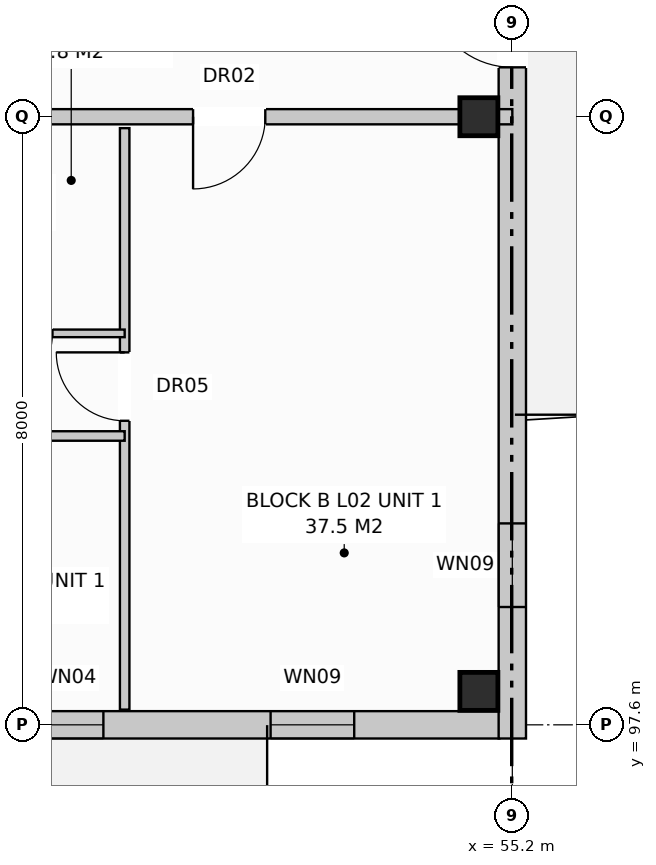
"""IFC4 building model, lengths in metres.
Left out: names, types, materials, properties, quantities, classifications, styles, units other than length and angle.
Written with IfcOpenShell. Run it as: python <this file> out.ifc"""

import sys

from ifc_helpers import new_model, si_unit, direction, frame, frame_2d, origin, origin_with_axes, origin_2d, place, context, subcontext, project, spatial, rectangle, extrude, element, fill, save


model = new_model("IFC4")
c1 = context("Model", 3, precision=1e-05, world=origin(), true_north=direction((0.0, 1.0)))
c2 = subcontext(c1, "Body", "Model", "MODEL_VIEW")
j1 = project(units=[si_unit("LENGTHUNIT", "METRE"), si_unit("PLANEANGLEUNIT", "RADIAN")], contexts=[c1])
p1 = place(None, origin())
s1 = spatial("IfcSite", under=j1, at=p1, CompositionType="ELEMENT")
p2 = place(p1, origin())
s2 = spatial("IfcBuilding", under=s1, at=p2, CompositionType="ELEMENT")
p3 = place(p2, frame((0.0, 0.0, 8.0)))
s3 = spatial("IfcBuildingStorey", under=s2, at=p3, CompositionType="ELEMENT", Elevation=8.0)
for number, where, z_axis, x_axis in (
    (1, (54.76, 98.04, 0.0), (0.0, 0.0, 1.0), (1.0, 0.0, 0.0)),
    (2, (54.76, 105.6, 0.0), (0.0, 0.0, 1.0), (1.0, 0.0, 0.0)),
):
    element("IfcColumn", number, at=place(p3, frame(where, z_axis=z_axis, x_axis=x_axis)), inside=s3, PredefinedType="COLUMN", context=c2, shape_type="SweptSolid", body=[
        extrude(rectangle(XDim=0.5, YDim=0.5, at=origin_2d()), origin(), (0.0, 0.0, 1.0), 3.2),
    ])
p4 = place(p3, frame((31.35, 97.6, 0.0), z_axis=(0.0, 0.0, 1.0), x_axis=(1.0, 0.0, 0.0)))
e3 = element("IfcWall", 3, at=p4, inside=s3, PredefinedType="STANDARD", context=c2, shape_type="SweptSolid", body=[
    extrude(rectangle(XDim=23.68, YDim=0.36, at=frame_2d((11.84, 0.0))), origin(), (0.0, 0.0, 1.0), 2.94),
])
p5 = place(p4, frame((15.32, 0.0, 0.0)))
e4 = element("IfcOpeningElement", 4, at=p5, cuts=e3, PredefinedType="OPENING", context=c2, shape_type="SweptSolid", body=[
    extrude(rectangle(XDim=0.95, YDim=2.1, at=frame_2d((0.475, 1.05))), frame((0.0, 0.192, 0.0), z_axis=(0.0, -1.0, 0.0), x_axis=(1.0, 0.0, 0.0)), (0.0, 0.0, 1.0), 0.384),
])
p6 = place(p4, frame((11.67, 0.0, 0.72)))
e5 = element("IfcOpeningElement", 5, at=p6, cuts=e3, PredefinedType="OPENING", context=c2, shape_type="SweptSolid", body=[
    extrude(rectangle(XDim=1.1, YDim=1.5, at=frame_2d((0.55, 0.75))), frame((0.0, 0.192, 0.0), z_axis=(0.0, -1.0, 0.0), x_axis=(1.0, 0.0, 0.0)), (0.0, 0.0, 1.0), 0.384),
])
p7 = place(p4, frame((17.52, 0.0, 0.9)))
e6 = element("IfcOpeningElement", 6, at=p7, cuts=e3, PredefinedType="OPENING", context=c2, shape_type="SweptSolid", body=[
    extrude(rectangle(XDim=0.95, YDim=1.55, at=frame_2d((0.475, 0.775))), frame((0.0, 0.192, 0.0), z_axis=(0.0, -1.0, 0.0), x_axis=(1.0, 0.0, 0.0)), (0.0, 0.0, 1.0), 0.384),
])
p8 = place(p4, frame((20.67, 0.0, 0.72)))
e7 = element("IfcOpeningElement", 7, at=p8, cuts=e3, PredefinedType="OPENING", context=c2, shape_type="SweptSolid", body=[
    extrude(rectangle(XDim=1.1, YDim=1.5, at=frame_2d((0.55, 0.75))), frame((0.0, 0.192, 0.0), z_axis=(0.0, -1.0, 0.0), x_axis=(1.0, 0.0, 0.0)), (0.0, 0.0, 1.0), 0.384),
])
p9 = place(p3, frame((55.2, 97.42, 0.0), z_axis=(0.0, 0.0, 1.0), x_axis=(0.0, 1.0, 0.0)))
e8 = element("IfcWall", 8, at=p9, inside=s3, PredefinedType="STANDARD", context=c2, shape_type="SweptSolid", body=[
    extrude(rectangle(XDim=18.76, YDim=0.36, at=frame_2d((9.38, 0.0))), origin(), (0.0, 0.0, 1.0), 2.94),
])
p10 = place(p9, frame((8.83, 0.0, 0.0)))
e9 = element("IfcOpeningElement", 9, at=p10, cuts=e8, PredefinedType="OPENING", context=c2, shape_type="SweptSolid", body=[
    extrude(rectangle(XDim=1.1, YDim=2.1, at=frame_2d((0.55, 1.05))), frame((0.0, 0.192, 0.0), z_axis=(0.0, -1.0, 0.0), x_axis=(1.0, 0.0, 0.0)), (0.0, 0.0, 1.0), 0.384),
])
p11 = place(p9, frame((1.73, 0.0, 0.72)))
e10 = element("IfcOpeningElement", 10, at=p11, cuts=e8, PredefinedType="OPENING", context=c2, shape_type="SweptSolid", body=[
    extrude(rectangle(XDim=1.1, YDim=1.5, at=frame_2d((0.55, 0.75))), frame((0.0, 0.192, 0.0), z_axis=(0.0, -1.0, 0.0), x_axis=(1.0, 0.0, 0.0)), (0.0, 0.0, 1.0), 0.384),
])
p12 = place(p9, frame((15.93, 0.0, 0.72)))
e11 = element("IfcOpeningElement", 11, at=p12, cuts=e8, PredefinedType="OPENING", context=c2, shape_type="SweptSolid", body=[
    extrude(rectangle(XDim=1.1, YDim=1.5, at=frame_2d((0.55, 0.75))), frame((0.0, 0.192, 0.0), z_axis=(0.0, -1.0, 0.0), x_axis=(1.0, 0.0, 0.0)), (0.0, 0.0, 1.0), 0.384),
])
p13 = place(p3, frame((41.4, 105.6, 0.0), z_axis=(0.0, 0.0, 1.0), x_axis=(1.0, 0.0, 0.0)))
e12 = element("IfcWall", 12, at=p13, inside=s3, PredefinedType="PARTITIONING", context=c2, shape_type="SweptSolid", body=[
    extrude(rectangle(XDim=13.8, YDim=0.2, at=frame_2d((6.9, 0.0))), origin(), (0.0, 0.0, 1.0), 2.38),
])
p14 = place(p13, frame((9.6, 0.0, 0.0)))
e13 = element("IfcOpeningElement", 13, at=p14, cuts=e12, PredefinedType="OPENING", context=c2, shape_type="SweptSolid", body=[
    extrude(rectangle(XDim=0.95, YDim=2.15, at=frame_2d((0.475, 1.075))), frame((0.0, 0.112, 0.0), z_axis=(0.0, -1.0, 0.0), x_axis=(1.0, 0.0, 0.0)), (0.0, 0.0, 1.0), 0.224),
])
p15 = place(p3, frame((50.1, 105.45, 0.0), z_axis=(0.0, 0.0, 1.0), x_axis=(0.0, -1.0, 0.0)))
e14 = element("IfcWall", 14, at=p15, inside=s3, PredefinedType="PARTITIONING", context=c2, shape_type="SweptSolid", body=[
    extrude(rectangle(XDim=7.65, YDim=0.125, at=frame_2d((3.825, 0.0))), origin(), (0.0, 0.0, 1.0), 2.94),
])
p16 = place(p15, frame((2.95, 0.0, 0.0)))
e15 = element("IfcOpeningElement", 15, at=p16, cuts=e14, PredefinedType="OPENING", context=c2, shape_type="SweptSolid", body=[
    extrude(rectangle(XDim=0.9, YDim=2.1, at=frame_2d((0.45, 1.05))), frame((0.0, 0.074, 0.0), z_axis=(0.0, -1.0, 0.0), x_axis=(1.0, 0.0, 0.0)), (0.0, 0.0, 1.0), 0.149),
])
p17 = place(p3, frame((41.5, 102.75, 0.0), z_axis=(0.0, 0.0, 1.0), x_axis=(1.0, 0.0, 0.0)))
e16 = element("IfcWall", 16, at=p17, inside=s3, PredefinedType="PARTITIONING", context=c2, shape_type="SweptSolid", body=[
    extrude(rectangle(XDim=8.6, YDim=0.1, at=frame_2d((4.3, 0.0))), origin(), (0.0, 0.0, 1.0), 2.94),
])
p18 = place(p17, frame((1.4, 0.0, 0.0)))
e17 = element("IfcOpeningElement", 17, at=p18, cuts=e16, PredefinedType="OPENING", context=c2, shape_type="SweptSolid", body=[
    extrude(rectangle(XDim=0.85, YDim=2.05, at=frame_2d((0.425, 1.025))), frame((0.0, 0.062, 0.0), z_axis=(0.0, -1.0, 0.0), x_axis=(1.0, 0.0, 0.0)), (0.0, 0.0, 1.0), 0.124),
])
p19 = place(p17, frame((4.65, 0.0, 0.0)))
e18 = element("IfcOpeningElement", 18, at=p19, cuts=e16, PredefinedType="OPENING", context=c2, shape_type="SweptSolid", body=[
    extrude(rectangle(XDim=0.85, YDim=2.05, at=frame_2d((0.425, 1.025))), frame((0.0, 0.062, 0.0), z_axis=(0.0, -1.0, 0.0), x_axis=(1.0, 0.0, 0.0)), (0.0, 0.0, 1.0), 0.124),
])
p20 = place(p17, frame((6.8, 0.0, 0.0)))
e19 = element("IfcOpeningElement", 19, at=p20, cuts=e16, PredefinedType="OPENING", context=c2, shape_type="SweptSolid", body=[
    extrude(rectangle(XDim=0.85, YDim=2.1, at=frame_2d((0.425, 1.05))), frame((0.0, 0.062, 0.0), z_axis=(0.0, -1.0, 0.0), x_axis=(1.0, 0.0, 0.0)), (0.0, 0.0, 1.0), 0.124),
])
p21 = place(p3, frame((45.6, 101.4, 0.0), z_axis=(0.0, 0.0, 1.0), x_axis=(1.0, 0.0, 0.0)))
e20 = element("IfcWall", 20, at=p21, inside=s3, PredefinedType="PARTITIONING", context=c2, shape_type="SweptSolid", body=[
    extrude(rectangle(XDim=4.5, YDim=0.125, at=frame_2d((2.25, 0.0))), origin(), (0.0, 0.0, 1.0), 2.94),
])
p22 = place(p21, frame((1.6, 0.0, 0.0)))
e21 = element("IfcOpeningElement", 21, at=p22, cuts=e20, PredefinedType="OPENING", context=c2, shape_type="SweptSolid", body=[
    extrude(rectangle(XDim=0.9, YDim=2.1, at=frame_2d((0.45, 1.05))), frame((0.0, 0.074, 0.0), z_axis=(0.0, -1.0, 0.0), x_axis=(1.0, 0.0, 0.0)), (0.0, 0.0, 1.0), 0.149),
])
p23 = place(p7, origin_with_axes())
e22 = element("IfcWindow", 22, at=p23, inside=s3, PartitioningType="SINGLE_PANEL", PredefinedType="WINDOW", context=c2, shape_type="SweptSolid", body=[
    extrude(rectangle(XDim=0.95, YDim=1.55, at=frame_2d((0.475, 0.775))), frame((0.0, 0.03, 0.0), z_axis=(0.0, -1.0, 0.0), x_axis=(1.0, 0.0, 0.0)), (0.0, 0.0, 1.0), 0.06),
])
fill(e6, e22)
p24 = place(p8, origin_with_axes())
e23 = element("IfcWindow", 23, at=p24, inside=s3, PartitioningType="SINGLE_PANEL", PredefinedType="WINDOW", context=c2, shape_type="SweptSolid", body=[
    extrude(rectangle(XDim=1.1, YDim=1.5, at=frame_2d((0.55, 0.75))), frame((0.0, 0.03, 0.0), z_axis=(0.0, -1.0, 0.0), x_axis=(1.0, 0.0, 0.0)), (0.0, 0.0, 1.0), 0.06),
])
fill(e7, e23)
p25 = place(p10, origin_with_axes())
e24 = element("IfcDoor", 24, at=p25, inside=s3, OperationType="SINGLE_SWING_RIGHT", PredefinedType="DOOR", context=c2, shape_type="SweptSolid", body=[
    extrude(rectangle(XDim=1.1, YDim=2.1, at=frame_2d((0.55, 1.05))), frame((0.0, 0.025, 0.0), z_axis=(0.0, -1.0, 0.0), x_axis=(1.0, 0.0, 0.0)), (0.0, 0.0, 1.0), 0.05),
])
fill(e9, e24)
p26 = place(p11, origin_with_axes())
e25 = element("IfcWindow", 25, at=p26, inside=s3, PartitioningType="SINGLE_PANEL", PredefinedType="WINDOW", context=c2, shape_type="SweptSolid", body=[
    extrude(rectangle(XDim=1.1, YDim=1.5, at=frame_2d((0.55, 0.75))), frame((0.0, 0.03, 0.0), z_axis=(0.0, -1.0, 0.0), x_axis=(1.0, 0.0, 0.0)), (0.0, 0.0, 1.0), 0.06),
])
fill(e10, e25)
p27 = place(p14, frame((0.95, 0.0, 0.0), z_axis=(0.0, 0.0, 1.0), x_axis=(-1.0, 0.0, 0.0)))
e26 = element("IfcDoor", 26, at=p27, inside=s3, OperationType="SINGLE_SWING_LEFT", PredefinedType="DOOR", context=c2, shape_type="SweptSolid", body=[
    extrude(rectangle(XDim=0.95, YDim=2.15, at=frame_2d((0.475, 1.075))), frame((0.0, 0.025, 0.0), z_axis=(0.0, -1.0, 0.0), x_axis=(1.0, 0.0, 0.0)), (0.0, 0.0, 1.0), 0.05),
])
fill(e13, e26)
p28 = place(p16, frame((0.9, 0.0, 0.0), z_axis=(0.0, 0.0, 1.0), x_axis=(-1.0, 0.0, 0.0)))
e27 = element("IfcDoor", 27, at=p28, inside=s3, OperationType="SINGLE_SWING_LEFT", PredefinedType="DOOR", context=c2, shape_type="SweptSolid", body=[
    extrude(rectangle(XDim=0.9, YDim=2.1, at=frame_2d((0.45, 1.05))), frame((0.0, 0.025, 0.0), z_axis=(0.0, -1.0, 0.0), x_axis=(1.0, 0.0, 0.0)), (0.0, 0.0, 1.0), 0.05),
])
fill(e15, e27)
p29 = place(p20, frame((0.85, 0.0, 0.0), z_axis=(0.0, 0.0, 1.0), x_axis=(-1.0, 0.0, 0.0)))
e28 = element("IfcDoor", 28, at=p29, inside=s3, OperationType="SINGLE_SWING_LEFT", PredefinedType="DOOR", context=c2, shape_type="SweptSolid", body=[
    extrude(rectangle(XDim=0.85, YDim=2.1, at=frame_2d((0.425, 1.05))), frame((0.0, 0.025, 0.0), z_axis=(0.0, -1.0, 0.0), x_axis=(1.0, 0.0, 0.0)), (0.0, 0.0, 1.0), 0.05),
])
fill(e19, e28)
save(model, sys.argv[1])
